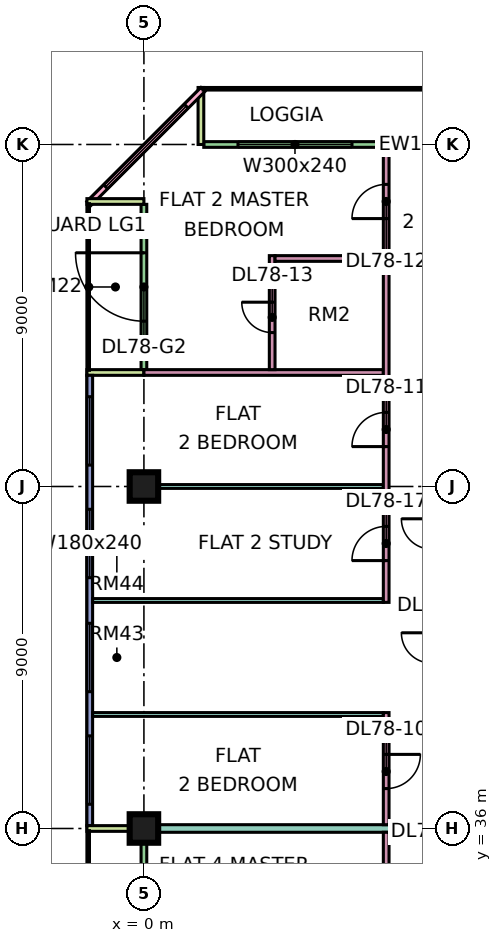
"""IFC4 building model, lengths in metres.
Left out: names, types, materials, properties, quantities, classifications, styles, units other than length and angle.
Written with IfcOpenShell. Run it as: python <this file> out.ifc"""

import sys

from ifc_helpers import new_model, si_unit, direction, frame, frame_2d, origin, origin_2d, place, context, subcontext, project, spatial, rectangle, extrude, element, fill, save


model = new_model("IFC4")
c1 = context("Model", 3, precision=1e-05, world=origin(), true_north=direction((0.0, 1.0)))
c2 = subcontext(c1, "Body", "Model", "MODEL_VIEW")
j1 = project(units=[si_unit("LENGTHUNIT", "METRE"), si_unit("PLANEANGLEUNIT", "RADIAN")], contexts=[c1])
p1 = place(None, origin())
s1 = spatial("IfcSite", under=j1, at=p1, CompositionType="ELEMENT")
p2 = place(p1, origin())
s2 = spatial("IfcBuilding", under=s1, at=p2, CompositionType="ELEMENT")
p3 = place(p2, frame((0.0, 0.0, 338.9)))
s3 = spatial("IfcBuildingStorey", under=s2, at=p3, CompositionType="ELEMENT", Elevation=338.9)
p4 = place(p3, frame((0.0, 36.0, 0.0), z_axis=(0.0, 0.0, 1.0), x_axis=(1.0, 0.0, 0.0)))
e1 = element("IfcColumn", 1, at=p4, inside=s3, PredefinedType="COLUMN", context=c2, shape_type="SweptSolid", body=[
    extrude(rectangle(XDim=0.75, YDim=0.75, at=origin_2d()), origin(), (0.0, 0.0, 1.0), 3.75),
])
p5 = place(p3, frame((0.0, 45.0, 0.0), z_axis=(0.0, 0.0, 1.0), x_axis=(1.0, 0.0, 0.0)))
e2 = element("IfcColumn", 2, at=p5, inside=s3, PredefinedType="COLUMN", context=c2, shape_type="SweptSolid", body=[
    extrude(rectangle(XDim=0.75, YDim=0.75, at=origin_2d()), origin(), (0.0, 0.0, 1.0), 3.75),
])
p6 = place(p3, frame((11.925, 54.0, 0.0), z_axis=(0.0, 0.0, 1.0), x_axis=(-1.0, 0.0, 0.0)))
e3 = element("IfcWall", 3, at=p6, inside=s3, PredefinedType="SOLIDWALL", context=c2, shape_type="SweptSolid", body=[
    extrude(rectangle(XDim=10.35, YDim=0.15, at=frame_2d((5.175, 0.0))), origin(), (0.0, 0.0, 1.0), 3.35),
])
p7 = place(p6, frame((2.075, 0.0, 0.0)))
e4 = element("IfcOpeningElement", 4, at=p7, cuts=e3, PredefinedType="OPENING", context=c2, shape_type="SweptSolid", body=[
    extrude(rectangle(XDim=1.8, YDim=2.4, at=frame_2d((0.9, 1.2))), frame((0.0, 0.085, 0.0), z_axis=(0.0, -1.0, 0.0), x_axis=(1.0, 0.0, 0.0)), (0.0, 0.0, 1.0), 0.17),
])
p8 = place(p6, frame((6.45, 0.0, 0.45)))
e5 = element("IfcOpeningElement", 5, at=p8, cuts=e3, PredefinedType="OPENING", context=c2, shape_type="SweptSolid", body=[
    extrude(rectangle(XDim=3.0, YDim=2.4, at=frame_2d((1.5, 1.2))), frame((0.0, 0.085, 0.0), z_axis=(0.0, -1.0, 0.0), x_axis=(1.0, 0.0, 0.0)), (0.0, 0.0, 1.0), 0.17),
])
p9 = place(p3, frame((1.5, 55.5, 0.0), z_axis=(0.0, 0.0, 1.0), x_axis=(0.0, -1.0, 0.0)))
e6 = element("IfcWall", 6, at=p9, inside=s3, PredefinedType="SOLIDWALL", context=c2, shape_type="SweptSolid", body=[
    extrude(rectangle(XDim=1.5, YDim=0.15, at=frame_2d((0.75, 0.0))), origin(), (0.0, 0.0, 1.0), 3.35),
])
p10 = place(p3, frame((1.553, 55.447, 0.0), z_axis=(0.0, 0.0, 1.0), x_axis=(-0.707106781187, -0.707106781187, 0.0)))
e7 = element("IfcWall", 7, at=p10, inside=s3, PredefinedType="SOLIDWALL", context=c2, shape_type="SweptSolid", body=[
    extrude(rectangle(XDim=4.243, YDim=0.15, at=frame_2d((2.121, 0.0))), origin(), (0.0, 0.0, 1.0), 3.35),
])
p11 = place(p10, frame((0.621, 0.0, 0.45)))
e8 = element("IfcOpeningElement", 8, at=p11, cuts=e7, PredefinedType="OPENING", context=c2, shape_type="SweptSolid", body=[
    extrude(rectangle(XDim=3.0, YDim=2.4, at=frame_2d((1.5, 1.2))), frame((0.0, 0.085, 0.0), z_axis=(0.0, -1.0, 0.0), x_axis=(1.0, 0.0, 0.0)), (0.0, 0.0, 1.0), 0.17),
])
p12 = place(p3, frame((0.0, 52.425, 0.0), z_axis=(0.0, 0.0, 1.0), x_axis=(0.0, -1.0, 0.0)))
e9 = element("IfcWall", 9, at=p12, inside=s3, PredefinedType="SOLIDWALL", context=c2, shape_type="SweptSolid", body=[
    extrude(rectangle(XDim=4.35, YDim=0.15, at=frame_2d((2.175, 0.0))), origin(), (0.0, 0.0, 1.0), 3.35),
])
p13 = place(p12, frame((1.275, 0.0, 0.0)))
e10 = element("IfcOpeningElement", 10, at=p13, cuts=e9, PredefinedType="OPENING", context=c2, shape_type="SweptSolid", body=[
    extrude(rectangle(XDim=1.8, YDim=2.4, at=frame_2d((0.9, 1.2))), frame((0.0, 0.085, 0.0), z_axis=(0.0, -1.0, 0.0), x_axis=(1.0, 0.0, 0.0)), (0.0, 0.0, 1.0), 0.17),
])
for number, where, z_axis, x_axis in (
    (11, (-1.5, 52.5, 0.0), (0.0, 0.0, 1.0), (1.0, 0.0, 0.0)),
    (12, (-1.5, 48.0, 0.0), (0.0, 0.0, 1.0), (1.0, 0.0, 0.0)),
):
    element("IfcWall", number, at=place(p3, frame(where, z_axis=z_axis, x_axis=x_axis)), inside=s3, PredefinedType="SOLIDWALL", context=c2, shape_type="SweptSolid", body=[
        extrude(rectangle(XDim=1.5, YDim=0.15, at=frame_2d((0.75, 0.0))), origin(), (0.0, 0.0, 1.0), 3.35),
    ])
p14 = place(p3, frame((-1.425, 47.925, 0.0), z_axis=(0.0, 0.0, 1.0), x_axis=(0.0, -1.0, 0.0)))
e13 = element("IfcWall", 13, at=p14, inside=s3, PredefinedType="SOLIDWALL", context=c2, shape_type="SweptSolid", body=[
    extrude(rectangle(XDim=11.85, YDim=0.15, at=frame_2d((5.925, 0.0))), origin(), (0.0, 0.0, 1.0), 3.35),
])
p15 = place(p14, frame((0.562, 0.0, 0.45)))
e14 = element("IfcOpeningElement", 14, at=p15, cuts=e13, PredefinedType="OPENING", context=c2, shape_type="SweptSolid", body=[
    extrude(rectangle(XDim=1.8, YDim=2.4, at=frame_2d((0.9, 1.2))), frame((0.0, 0.085, 0.0), z_axis=(0.0, -1.0, 0.0), x_axis=(1.0, 0.0, 0.0)), (0.0, 0.0, 1.0), 0.17),
])
p16 = place(p14, frame((3.525, 0.0, 0.45)))
e15 = element("IfcOpeningElement", 15, at=p16, cuts=e13, PredefinedType="OPENING", context=c2, shape_type="SweptSolid", body=[
    extrude(rectangle(XDim=1.8, YDim=2.4, at=frame_2d((0.9, 1.2))), frame((0.0, 0.085, 0.0), z_axis=(0.0, -1.0, 0.0), x_axis=(1.0, 0.0, 0.0)), (0.0, 0.0, 1.0), 0.17),
])
p17 = place(p14, frame((6.525, 0.0, 0.45)))
e16 = element("IfcOpeningElement", 16, at=p17, cuts=e13, PredefinedType="OPENING", context=c2, shape_type="SweptSolid", body=[
    extrude(rectangle(XDim=1.8, YDim=2.4, at=frame_2d((0.9, 1.2))), frame((0.0, 0.085, 0.0), z_axis=(0.0, -1.0, 0.0), x_axis=(1.0, 0.0, 0.0)), (0.0, 0.0, 1.0), 0.17),
])
p18 = place(p14, frame((9.488, 0.0, 0.45)))
e17 = element("IfcOpeningElement", 17, at=p18, cuts=e13, PredefinedType="OPENING", context=c2, shape_type="SweptSolid", body=[
    extrude(rectangle(XDim=1.8, YDim=2.4, at=frame_2d((0.9, 1.2))), frame((0.0, 0.085, 0.0), z_axis=(0.0, -1.0, 0.0), x_axis=(1.0, 0.0, 0.0)), (0.0, 0.0, 1.0), 0.17),
])
p19 = place(p3, frame((0.0, 35.925, 0.0), z_axis=(0.0, 0.0, 1.0), x_axis=(0.0, -1.0, 0.0)))
e18 = element("IfcWall", 18, at=p19, inside=s3, PredefinedType="SOLIDWALL", context=c2, shape_type="SweptSolid", body=[
    extrude(rectangle(XDim=11.85, YDim=0.15, at=frame_2d((5.925, 0.0))), origin(), (0.0, 0.0, 1.0), 3.35),
])
p20 = place(p19, frame((2.262, 0.0, 0.0)))
e19 = element("IfcOpeningElement", 19, at=p20, cuts=e18, PredefinedType="OPENING", context=c2, shape_type="SweptSolid", body=[
    extrude(rectangle(XDim=1.8, YDim=2.4, at=frame_2d((0.9, 1.2))), frame((0.0, 0.085, 0.0), z_axis=(0.0, -1.0, 0.0), x_axis=(1.0, 0.0, 0.0)), (0.0, 0.0, 1.0), 0.17),
])
p21 = place(p19, frame((7.188, 0.0, 0.45)))
e20 = element("IfcOpeningElement", 20, at=p21, cuts=e18, PredefinedType="OPENING", context=c2, shape_type="SweptSolid", body=[
    extrude(rectangle(XDim=3.0, YDim=2.4, at=frame_2d((1.5, 1.2))), frame((0.0, 0.085, 0.0), z_axis=(0.0, -1.0, 0.0), x_axis=(1.0, 0.0, 0.0)), (0.0, 0.0, 1.0), 0.17),
])
p22 = place(p3, frame((-1.5, 36.0, 0.0), z_axis=(0.0, 0.0, 1.0), x_axis=(1.0, 0.0, 0.0)))
e21 = element("IfcWall", 21, at=p22, inside=s3, PredefinedType="SOLIDWALL", context=c2, shape_type="SweptSolid", body=[
    extrude(rectangle(XDim=1.5, YDim=0.15, at=frame_2d((0.75, 0.0))), origin(), (0.0, 0.0, 1.0), 3.35),
])
e22 = element("IfcWall", 22, at=p4, inside=s3, PredefinedType="PARTITIONING", context=c2, shape_type="SweptSolid", body=[
    extrude(rectangle(XDim=12.275, YDim=0.2, at=frame_2d((6.137, 0.0))), origin(), (0.0, 0.0, 1.0), 3.35),
])
for number, where, z_axis, x_axis in (
    (23, (-1.35, 39.0, 0.0), (0.0, 0.0, 1.0), (1.0, 0.0, 0.0)),
    (24, (-1.35, 42.0, 0.0), (0.0, 0.0, 1.0), (1.0, 0.0, 0.0)),
):
    element("IfcWall", number, at=place(p3, frame(where, z_axis=z_axis, x_axis=x_axis)), inside=s3, PredefinedType="PARTITIONING", context=c2, shape_type="SweptSolid", body=[
        extrude(rectangle(XDim=7.65, YDim=0.1, at=frame_2d((3.825, 0.0))), origin(), (0.0, 0.0, 1.0), 3.35),
    ])
e25 = element("IfcWall", 25, at=p5, inside=s3, PredefinedType="PARTITIONING", context=c2, shape_type="SweptSolid", body=[
    extrude(rectangle(XDim=6.3, YDim=0.1, at=frame_2d((3.15, 0.0))), origin(), (0.0, 0.0, 1.0), 3.35),
])
p23 = place(p3, frame((0.0, 48.0, 0.0), z_axis=(0.0, 0.0, 1.0), x_axis=(1.0, 0.0, 0.0)))
e26 = element("IfcWall", 26, at=p23, inside=s3, PredefinedType="PARTITIONING", context=c2, shape_type="SweptSolid", body=[
    extrude(rectangle(XDim=6.3, YDim=0.15, at=frame_2d((3.15, 0.0))), origin(), (0.0, 0.0, 1.0), 3.35),
])
p24 = place(p3, frame((3.375, 48.075, 0.0), z_axis=(0.0, 0.0, 1.0), x_axis=(0.0, 1.0, 0.0)))
e27 = element("IfcWall", 27, at=p24, inside=s3, PredefinedType="PARTITIONING", context=c2, shape_type="SweptSolid", body=[
    extrude(rectangle(XDim=3.0, YDim=0.15, at=frame_2d((1.5, 0.0))), origin(), (0.0, 0.0, 1.0), 3.35),
])
p25 = place(p24, frame((0.975, 0.0, 0.0)))
e28 = element("IfcOpeningElement", 28, at=p25, cuts=e27, PredefinedType="OPENING", context=c2, shape_type="SweptSolid", body=[
    extrude(rectangle(XDim=0.8, YDim=2.1, at=frame_2d((0.4, 1.05))), frame((0.0, 0.085, 0.0), z_axis=(0.0, -1.0, 0.0), x_axis=(1.0, 0.0, 0.0)), (0.0, 0.0, 1.0), 0.17),
])
p26 = place(p3, frame((3.45, 51.0, 0.0), z_axis=(0.0, 0.0, 1.0), x_axis=(1.0, 0.0, 0.0)))
e29 = element("IfcWall", 29, at=p26, inside=s3, PredefinedType="PARTITIONING", context=c2, shape_type="SweptSolid", body=[
    extrude(rectangle(XDim=2.85, YDim=0.15, at=frame_2d((1.425, 0.0))), origin(), (0.0, 0.0, 1.0), 3.35),
])
p27 = place(p3, frame((6.375, 30.075, 0.0), z_axis=(0.0, 0.0, 1.0), x_axis=(0.0, 1.0, 0.0)))
e30 = element("IfcWall", 30, at=p27, inside=s3, PredefinedType="PARTITIONING", context=c2, shape_type="SweptSolid", body=[
    extrude(rectangle(XDim=5.825, YDim=0.15, at=frame_2d((2.913, 0.0))), origin(), (0.0, 0.0, 1.0), 3.35),
])
p28 = place(p27, frame((3.975, 0.0, 0.0)))
e31 = element("IfcOpeningElement", 31, at=p28, cuts=e30, PredefinedType="OPENING", context=c2, shape_type="SweptSolid", body=[
    extrude(rectangle(XDim=0.9, YDim=2.1, at=frame_2d((0.45, 1.05))), frame((0.0, 0.085, 0.0), z_axis=(0.0, -1.0, 0.0), x_axis=(1.0, 0.0, 0.0)), (0.0, 0.0, 1.0), 0.17),
])
p29 = place(p3, frame((6.375, 36.1, 0.0), z_axis=(0.0, 0.0, 1.0), x_axis=(0.0, 1.0, 0.0)))
e32 = element("IfcWall", 32, at=p29, inside=s3, PredefinedType="PARTITIONING", context=c2, shape_type="SweptSolid", body=[
    extrude(rectangle(XDim=2.95, YDim=0.15, at=frame_2d((1.475, 0.0))), origin(), (0.0, 0.0, 1.0), 3.35),
])
p30 = place(p29, frame((0.95, 0.0, 0.0)))
e33 = element("IfcOpeningElement", 33, at=p30, cuts=e32, PredefinedType="OPENING", context=c2, shape_type="SweptSolid", body=[
    extrude(rectangle(XDim=0.9, YDim=2.1, at=frame_2d((0.45, 1.05))), frame((0.0, 0.085, 0.0), z_axis=(0.0, -1.0, 0.0), x_axis=(1.0, 0.0, 0.0)), (0.0, 0.0, 1.0), 0.17),
])
p31 = place(p3, frame((6.375, 41.95, 0.0), z_axis=(0.0, 0.0, 1.0), x_axis=(0.0, 1.0, 0.0)))
e34 = element("IfcWall", 34, at=p31, inside=s3, PredefinedType="PARTITIONING", context=c2, shape_type="SweptSolid", body=[
    extrude(rectangle(XDim=11.976, YDim=0.15, at=frame_2d((5.988, 0.0))), origin(), (0.0, 0.0, 1.0), 3.35),
])
p32 = place(p31, frame((4.1, 0.0, 0.0)))
e35 = element("IfcOpeningElement", 35, at=p32, cuts=e34, PredefinedType="OPENING", context=c2, shape_type="SweptSolid", body=[
    extrude(rectangle(XDim=0.9, YDim=2.1, at=frame_2d((0.45, 1.05))), frame((0.0, 0.085, 0.0), z_axis=(0.0, -1.0, 0.0), x_axis=(1.0, 0.0, 0.0)), (0.0, 0.0, 1.0), 0.17),
])
p33 = place(p31, frame((10.1, 0.0, 0.0)))
e36 = element("IfcOpeningElement", 36, at=p33, cuts=e34, PredefinedType="OPENING", context=c2, shape_type="SweptSolid", body=[
    extrude(rectangle(XDim=0.9, YDim=2.1, at=frame_2d((0.45, 1.05))), frame((0.0, 0.085, 0.0), z_axis=(0.0, -1.0, 0.0), x_axis=(1.0, 0.0, 0.0)), (0.0, 0.0, 1.0), 0.17),
])
p34 = place(p31, frame((1.1, 0.0, 0.0)))
e37 = element("IfcOpeningElement", 37, at=p34, cuts=e34, PredefinedType="OPENING", context=c2, shape_type="SweptSolid", body=[
    extrude(rectangle(XDim=0.9, YDim=2.1, at=frame_2d((0.45, 1.05))), frame((0.0, 0.085, 0.0), z_axis=(0.0, -1.0, 0.0), x_axis=(1.0, 0.0, 0.0)), (0.0, 0.0, 1.0), 0.17),
])
p35 = place(p8, origin())
e38 = element("IfcWindow", 38, at=p35, inside=s3, PartitioningType="SINGLE_PANEL", PredefinedType="WINDOW", context=c2, shape_type="SweptSolid", body=[
    extrude(rectangle(XDim=3.0, YDim=2.4, at=frame_2d((1.5, 1.2))), frame((0.0, 0.03, 0.0), z_axis=(0.0, -1.0, 0.0), x_axis=(1.0, 0.0, 0.0)), (0.0, 0.0, 1.0), 0.06),
])
fill(e5, e38)
p36 = place(p11, origin())
e39 = element("IfcWindow", 39, at=p36, inside=s3, PartitioningType="SINGLE_PANEL", PredefinedType="WINDOW", context=c2, shape_type="SweptSolid", body=[
    extrude(rectangle(XDim=3.0, YDim=2.4, at=frame_2d((1.5, 1.2))), frame((0.0, 0.03, 0.0), z_axis=(0.0, -1.0, 0.0), x_axis=(1.0, 0.0, 0.0)), (0.0, 0.0, 1.0), 0.06),
])
fill(e8, e39)
p37 = place(p13, frame((1.8, 0.0, 0.0), z_axis=(0.0, 0.0, 1.0), x_axis=(-1.0, 0.0, 0.0)))
e40 = element("IfcDoor", 40, at=p37, inside=s3, OperationType="DOUBLE_DOOR_SINGLE_SWING", PredefinedType="DOOR", context=c2, shape_type="SweptSolid", body=[
    extrude(rectangle(XDim=1.8, YDim=2.4, at=frame_2d((0.9, 1.2))), frame((0.0, 0.025, 0.0), z_axis=(0.0, -1.0, 0.0), x_axis=(1.0, 0.0, 0.0)), (0.0, 0.0, 1.0), 0.05),
])
fill(e10, e40)
p38 = place(p15, origin())
e41 = element("IfcWindow", 41, at=p38, inside=s3, PartitioningType="SINGLE_PANEL", PredefinedType="WINDOW", context=c2, shape_type="SweptSolid", body=[
    extrude(rectangle(XDim=1.8, YDim=2.4, at=frame_2d((0.9, 1.2))), frame((0.0, 0.03, 0.0), z_axis=(0.0, -1.0, 0.0), x_axis=(1.0, 0.0, 0.0)), (0.0, 0.0, 1.0), 0.06),
])
fill(e14, e41)
p39 = place(p16, origin())
e42 = element("IfcWindow", 42, at=p39, inside=s3, PartitioningType="SINGLE_PANEL", PredefinedType="WINDOW", context=c2, shape_type="SweptSolid", body=[
    extrude(rectangle(XDim=1.8, YDim=2.4, at=frame_2d((0.9, 1.2))), frame((0.0, 0.03, 0.0), z_axis=(0.0, -1.0, 0.0), x_axis=(1.0, 0.0, 0.0)), (0.0, 0.0, 1.0), 0.06),
])
fill(e15, e42)
p40 = place(p17, origin())
e43 = element("IfcWindow", 43, at=p40, inside=s3, PartitioningType="SINGLE_PANEL", PredefinedType="WINDOW", context=c2, shape_type="SweptSolid", body=[
    extrude(rectangle(XDim=1.8, YDim=2.4, at=frame_2d((0.9, 1.2))), frame((0.0, 0.03, 0.0), z_axis=(0.0, -1.0, 0.0), x_axis=(1.0, 0.0, 0.0)), (0.0, 0.0, 1.0), 0.06),
])
fill(e16, e43)
p41 = place(p18, origin())
e44 = element("IfcWindow", 44, at=p41, inside=s3, PartitioningType="SINGLE_PANEL", PredefinedType="WINDOW", context=c2, shape_type="SweptSolid", body=[
    extrude(rectangle(XDim=1.8, YDim=2.4, at=frame_2d((0.9, 1.2))), frame((0.0, 0.03, 0.0), z_axis=(0.0, -1.0, 0.0), x_axis=(1.0, 0.0, 0.0)), (0.0, 0.0, 1.0), 0.06),
])
fill(e17, e44)
p42 = place(p30, origin())
e45 = element("IfcDoor", 45, at=p42, inside=s3, OperationType="SINGLE_SWING_RIGHT", PredefinedType="DOOR", context=c2, shape_type="SweptSolid", body=[
    extrude(rectangle(XDim=0.9, YDim=2.1, at=frame_2d((0.45, 1.05))), frame((0.0, 0.025, 0.0), z_axis=(0.0, -1.0, 0.0), x_axis=(1.0, 0.0, 0.0)), (0.0, 0.0, 1.0), 0.05),
])
fill(e33, e45)
p43 = place(p32, origin())
e46 = element("IfcDoor", 46, at=p43, inside=s3, OperationType="SINGLE_SWING_LEFT", PredefinedType="DOOR", context=c2, shape_type="SweptSolid", body=[
    extrude(rectangle(XDim=0.9, YDim=2.1, at=frame_2d((0.45, 1.05))), frame((0.0, 0.025, 0.0), z_axis=(0.0, -1.0, 0.0), x_axis=(1.0, 0.0, 0.0)), (0.0, 0.0, 1.0), 0.05),
])
fill(e35, e46)
p44 = place(p33, origin())
e47 = element("IfcDoor", 47, at=p44, inside=s3, OperationType="SINGLE_SWING_LEFT", PredefinedType="DOOR", context=c2, shape_type="SweptSolid", body=[
    extrude(rectangle(XDim=0.9, YDim=2.1, at=frame_2d((0.45, 1.05))), frame((0.0, 0.025, 0.0), z_axis=(0.0, -1.0, 0.0), x_axis=(1.0, 0.0, 0.0)), (0.0, 0.0, 1.0), 0.05),
])
fill(e36, e47)
p45 = place(p25, frame((0.8, 0.0, 0.0), z_axis=(0.0, 0.0, 1.0), x_axis=(-1.0, 0.0, 0.0)))
e48 = element("IfcDoor", 48, at=p45, inside=s3, OperationType="SINGLE_SWING_RIGHT", PredefinedType="DOOR", context=c2, shape_type="SweptSolid", body=[
    extrude(rectangle(XDim=0.8, YDim=2.1, at=frame_2d((0.4, 1.05))), frame((0.0, 0.025, 0.0), z_axis=(0.0, -1.0, 0.0), x_axis=(1.0, 0.0, 0.0)), (0.0, 0.0, 1.0), 0.05),
])
fill(e28, e48)
p46 = place(p34, origin())
e49 = element("IfcDoor", 49, at=p46, inside=s3, OperationType="SINGLE_SWING_LEFT", PredefinedType="DOOR", context=c2, shape_type="SweptSolid", body=[
    extrude(rectangle(XDim=0.9, YDim=2.1, at=frame_2d((0.45, 1.05))), frame((0.0, 0.025, 0.0), z_axis=(0.0, -1.0, 0.0), x_axis=(1.0, 0.0, 0.0)), (0.0, 0.0, 1.0), 0.05),
])
fill(e37, e49)
save(model, sys.argv[1])
